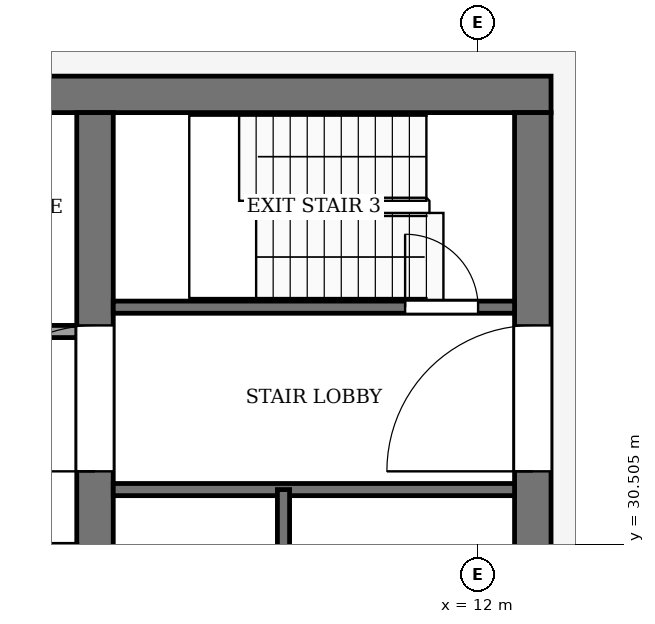
"""IFC4 building model, lengths in metres.
Left out: names, types, materials, properties, quantities, classifications, styles, units other than length and angle.
Written with IfcOpenShell. Run it as: python <this file> out.ifc"""

import sys

from ifc_helpers import new_model, si_unit, direction, frame, frame_2d, origin, place, context, subcontext, project, spatial, rectangle, extrude, element, fill, save


model = new_model("IFC4")
c1 = context("Model", 3, precision=1e-05, world=origin(), true_north=direction((0.0, 1.0)))
c2 = subcontext(c1, "Body", "Model", "MODEL_VIEW")
j1 = project(units=[si_unit("LENGTHUNIT", "METRE"), si_unit("PLANEANGLEUNIT", "RADIAN")], contexts=[c1])
p1 = place(None, origin())
s1 = spatial("IfcSite", under=j1, at=p1, CompositionType="ELEMENT")
p2 = place(p1, origin())
s2 = spatial("IfcBuilding", under=s1, at=p2, CompositionType="ELEMENT")
p3 = place(p2, frame((0.0, 0.0, 314.0)))
s3 = spatial("IfcBuildingStorey", under=s2, at=p3, CompositionType="ELEMENT", Elevation=314.0)
p4 = place(p3, frame((-13.2, 37.9, -0.13), z_axis=(0.0, 0.0, 1.0), x_axis=(1.0, 0.0, 0.0)))
e1 = element("IfcWall", 1, at=p4, inside=s3, PredefinedType="SHEAR", context=c2, shape_type="SweptSolid", body=[
    extrude(rectangle(XDim=26.4, YDim=0.6, at=frame_2d((13.2, 0.0))), origin(), (0.0, 0.0, 1.0), 4.0),
])
p5 = place(p3, frame((12.9, 18.4, -0.13), z_axis=(0.0, 0.0, 1.0), x_axis=(0.0, 1.0, 0.0)))
e2 = element("IfcWall", 2, at=p5, inside=s3, PredefinedType="SHEAR", context=c2, shape_type="SweptSolid", body=[
    extrude(rectangle(XDim=19.2, YDim=0.6, at=frame_2d((9.6, 0.0))), origin(), (0.0, 0.0, 1.0), 4.0),
])
p6 = place(p5, frame((2.8, 0.0, 0.13)))
e3 = element("IfcOpeningElement", 3, at=p6, cuts=e2, PredefinedType="OPENING", context=c2, shape_type="SweptSolid", body=[
    extrude(rectangle(XDim=2.4, YDim=2.4, at=frame_2d((1.2, 1.2))), frame((0.0, 0.31, 0.0), z_axis=(0.0, -1.0, 0.0), x_axis=(1.0, 0.0, 0.0)), (0.0, 0.0, 1.0), 0.62),
])
p7 = place(p5, frame((13.3, 0.0, 0.13)))
e4 = element("IfcOpeningElement", 4, at=p7, cuts=e2, PredefinedType="OPENING", context=c2, shape_type="SweptSolid", body=[
    extrude(rectangle(XDim=2.4, YDim=2.4, at=frame_2d((1.2, 1.2))), frame((0.0, 0.31, 0.0), z_axis=(0.0, -1.0, 0.0), x_axis=(1.0, 0.0, 0.0)), (0.0, 0.0, 1.0), 0.62),
])
p8 = place(p3, frame((5.7, 18.4, -0.13), z_axis=(0.0, 0.0, 1.0), x_axis=(0.0, 1.0, 0.0)))
e5 = element("IfcWall", 5, at=p8, inside=s3, PredefinedType="SHEAR", context=c2, shape_type="SweptSolid", body=[
    extrude(rectangle(XDim=19.2, YDim=0.6, at=frame_2d((9.6, 0.0))), origin(), (0.0, 0.0, 1.0), 4.0),
])
p9 = place(p8, frame((8.35, 0.0, 0.13)))
e6 = element("IfcOpeningElement", 6, at=p9, cuts=e5, PredefinedType="OPENING", context=c2, shape_type="SweptSolid", body=[
    extrude(rectangle(XDim=0.9, YDim=2.1, at=frame_2d((0.45, 1.05))), frame((0.0, 0.31, 0.0), z_axis=(0.0, -1.0, 0.0), x_axis=(1.0, 0.0, 0.0)), (0.0, 0.0, 1.0), 0.62),
])
p10 = place(p8, frame((13.3, 0.0, 0.13)))
e7 = element("IfcOpeningElement", 7, at=p10, cuts=e5, PredefinedType="OPENING", context=c2, shape_type="SweptSolid", body=[
    extrude(rectangle(XDim=2.4, YDim=2.4, at=frame_2d((1.2, 1.2))), frame((0.0, 0.31, 0.0), z_axis=(0.0, -1.0, 0.0), x_axis=(1.0, 0.0, 0.0)), (0.0, 0.0, 1.0), 0.62),
])
p11 = place(p3, frame((6.0, 31.4, 0.0), z_axis=(0.0, 0.0, 1.0), x_axis=(1.0, 0.0, 0.0)))
e8 = element("IfcWall", 8, at=p11, inside=s3, PredefinedType="PARTITIONING", context=c2, shape_type="SweptSolid", body=[
    extrude(rectangle(XDim=6.6, YDim=0.2, at=frame_2d((3.3, 0.0))), origin(), (0.0, 0.0, 1.0), 3.87),
])
p12 = place(p3, frame((-5.4, 34.0, 0.0), z_axis=(0.0, 0.0, 1.0), x_axis=(1.0, 0.0, 0.0)))
e9 = element("IfcWall", 9, at=p12, inside=s3, PredefinedType="PARTITIONING", context=c2, shape_type="SweptSolid", body=[
    extrude(rectangle(XDim=10.8, YDim=0.2, at=frame_2d((5.4, 0.0))), origin(), (0.0, 0.0, 1.0), 3.87),
])
p13 = place(p12, frame((6.15, 0.0, 0.0)))
e10 = element("IfcOpeningElement", 10, at=p13, cuts=e9, PredefinedType="OPENING", context=c2, shape_type="SweptSolid", body=[
    extrude(rectangle(XDim=1.2, YDim=2.2, at=frame_2d((0.6, 1.1))), frame((0.0, 0.11, 0.0), z_axis=(0.0, -1.0, 0.0), x_axis=(1.0, 0.0, 0.0)), (0.0, 0.0, 1.0), 0.22),
])
p14 = place(p12, frame((8.95, 0.0, 0.0)))
e11 = element("IfcOpeningElement", 11, at=p14, cuts=e9, PredefinedType="OPENING", context=c2, shape_type="SweptSolid", body=[
    extrude(rectangle(XDim=1.0, YDim=2.1, at=frame_2d((0.5, 1.05))), frame((0.0, 0.11, 0.0), z_axis=(0.0, -1.0, 0.0), x_axis=(1.0, 0.0, 0.0)), (0.0, 0.0, 1.0), 0.22),
])
p15 = place(p3, frame((6.0, 34.4, 0.0), z_axis=(0.0, 0.0, 1.0), x_axis=(1.0, 0.0, 0.0)))
e12 = element("IfcWall", 12, at=p15, inside=s3, PredefinedType="PARTITIONING", context=c2, shape_type="SweptSolid", body=[
    extrude(rectangle(XDim=6.6, YDim=0.2, at=frame_2d((3.3, 0.0))), origin(), (0.0, 0.0, 1.0), 3.87),
])
p16 = place(p15, frame((4.8, 0.0, 0.0)))
e13 = element("IfcOpeningElement", 13, at=p16, cuts=e12, PredefinedType="OPENING", context=c2, shape_type="SweptSolid", body=[
    extrude(rectangle(XDim=1.2, YDim=2.2, at=frame_2d((0.6, 1.1))), frame((0.0, 0.11, 0.0), z_axis=(0.0, -1.0, 0.0), x_axis=(1.0, 0.0, 0.0)), (0.0, 0.0, 1.0), 0.22),
])
p17 = place(p3, frame((8.8, 24.0, 0.0), z_axis=(0.0, 0.0, 1.0), x_axis=(0.0, 1.0, 0.0)))
e14 = element("IfcWall", 14, at=p17, inside=s3, PredefinedType="PARTITIONING", context=c2, shape_type="SweptSolid", body=[
    extrude(rectangle(XDim=7.4, YDim=0.2, at=frame_2d((3.7, 0.0))), origin(), (0.0, 0.0, 1.0), 3.87),
])
p18 = place(p16, origin())
e15 = element("IfcDoor", 15, at=p18, inside=s3, OperationType="SINGLE_SWING_RIGHT", PredefinedType="DOOR", context=c2, shape_type="SweptSolid", body=[
    extrude(rectangle(XDim=1.2, YDim=2.2, at=frame_2d((0.6, 1.1))), frame((0.0, 0.025, 0.0), z_axis=(0.0, -1.0, 0.0), x_axis=(1.0, 0.0, 0.0)), (0.0, 0.0, 1.0), 0.05),
])
fill(e13, e15)
p19 = place(p10, origin())
e16 = element("IfcDoor", 16, at=p19, inside=s3, OperationType="DOUBLE_DOOR_SINGLE_SWING", PredefinedType="DOOR", context=c2, shape_type="SweptSolid", body=[
    extrude(rectangle(XDim=2.4, YDim=2.4, at=frame_2d((1.2, 1.2))), frame((0.0, 0.025, 0.0), z_axis=(0.0, -1.0, 0.0), x_axis=(1.0, 0.0, 0.0)), (0.0, 0.0, 1.0), 0.05),
])
fill(e7, e16)
p20 = place(p7, origin())
e17 = element("IfcDoor", 17, at=p20, inside=s3, OperationType="DOUBLE_DOOR_SINGLE_SWING", PredefinedType="DOOR", context=c2, shape_type="SweptSolid", body=[
    extrude(rectangle(XDim=2.4, YDim=2.4, at=frame_2d((1.2, 1.2))), frame((0.0, 0.025, 0.0), z_axis=(0.0, -1.0, 0.0), x_axis=(1.0, 0.0, 0.0)), (0.0, 0.0, 1.0), 0.05),
])
fill(e4, e17)
save(model, sys.argv[1])
